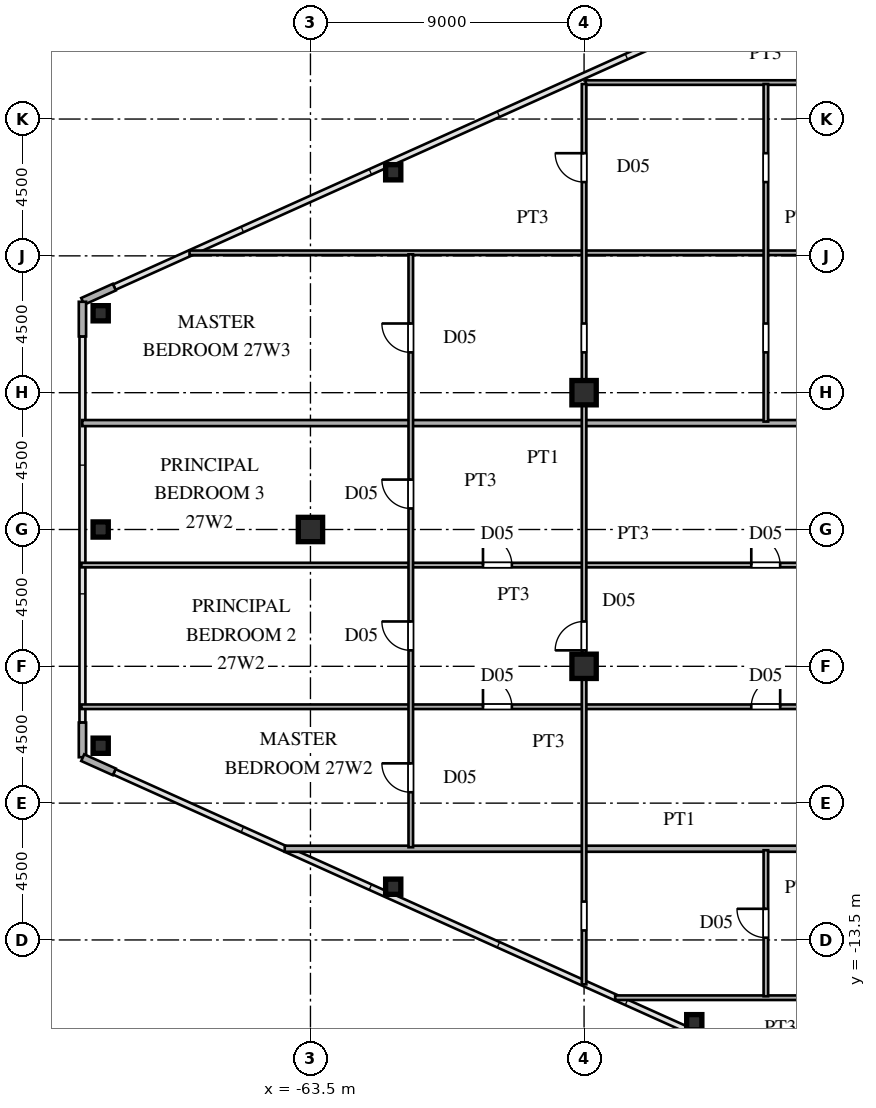
"""IFC4 building model, lengths in metres.
Left out: names, types, materials, properties, quantities, classifications, styles, units other than length and angle.
Written with IfcOpenShell. Run it as: python <this file> out.ifc"""

import sys

from ifc_helpers import new_model, si_unit, direction, frame, frame_2d, origin, origin_2d, place, context, subcontext, project, spatial, rectangle, hollow_rectangle, i_section, extrude, source, transform, mapped, element, fill, save


model = new_model("IFC4")
c1 = context("Model", 3, precision=1e-05, world=origin(), true_north=direction((0.0, 1.0)))
c2 = subcontext(c1, "Body", "Model", "MODEL_VIEW")
j1 = project(units=[si_unit("LENGTHUNIT", "METRE"), si_unit("PLANEANGLEUNIT", "RADIAN")], contexts=[c1])
p1 = place(None, origin())
s1 = spatial("IfcSite", under=j1, at=p1, CompositionType="ELEMENT")
p2 = place(p1, origin())
s2 = spatial("IfcBuilding", under=s1, at=p2, CompositionType="ELEMENT")
p3 = place(p2, frame((0.0, 0.0, 103.2)))
s3 = spatial("IfcBuildingStorey", under=s2, at=p3, CompositionType="ELEMENT", Elevation=103.2)
m1 = source(origin(), c2, "Body", "SweptSolid", [
    extrude(i_section(OverallWidth=0.8, OverallDepth=0.8, WebThickness=0.032, FlangeThickness=0.05, at=origin_2d()), origin(), (0.0, 0.0, 1.0), 3.6),
])
for number, where, z_axis, x_axis in (
    (1, (-54.5, -4.5, 0.0), (0.0, 0.0, 1.0), (1.0, 0.0, 0.0)),
    (2, (-54.5, 4.5, 0.0), (0.0, 0.0, 1.0), (1.0, 0.0, 0.0)),
    (3, (-63.5, 0.0, 0.0), (0.0, 0.0, 1.0), (1.0, 0.0, 0.0)),
):
    element("IfcColumn", number, at=place(p3, frame(where, z_axis=z_axis, x_axis=x_axis)), inside=s3, PredefinedType="COLUMN", context=c2, shape_type="MappedRepresentation", body=[
        mapped(m1, transform((0.0, 0.0, 0.0), scale=1.0)),
    ])
m2 = source(origin(), c2, "Body", "SweptSolid", [
    extrude(hollow_rectangle(XDim=0.5, YDim=0.5, WallThickness=0.02, at=origin_2d()), origin(), (0.0, 0.0, 1.0), 3.6),
])
for number, where, z_axis, x_axis in (
    (4, (-70.4, 7.112, 0.0), (0.0, 0.0, 1.0), (1.0, 0.0, 0.0)),
    (5, (-70.4, -7.112, 0.0), (0.0, 0.0, 1.0), (1.0, 0.0, 0.0)),
    (6, (-50.875, -16.205, 0.0), (0.0, 0.0, 1.0), (1.0, 0.0, 0.0)),
    (7, (-60.778, -11.749, 0.0), (0.0, 0.0, 1.0), (1.0, 0.0, 0.0)),
    (8, (-60.778, 11.749, 0.0), (0.0, 0.0, 1.0), (1.0, 0.0, 0.0)),
    (9, (-70.4, 0.0, 0.0), (0.0, 0.0, 1.0), (1.0, 0.0, 0.0)),
):
    element("IfcColumn", number, at=place(p3, frame(where, z_axis=z_axis, x_axis=x_axis)), inside=s3, PredefinedType="COLUMN", context=c2, shape_type="MappedRepresentation", body=[
        mapped(m2, transform((0.0, 0.0, 0.0), scale=1.0)),
    ])
for number, where, z_axis, x_axis in (
    (10, (-69.951, 7.972, 0.0), (0.0, 0.0, 1.0), (-0.912, -0.41, 0.0)),
    (11, (-71.0, 7.49, 0.0), (0.0, 0.0, 1.0), (0.0, -1.0, 0.0)),
    (12, (-71.0, -6.35, 0.0), (0.0, 0.0, 1.0), (0.0, -1.0, 0.0)),
    (13, (-70.991, -7.504, 0.0), (0.0, 0.0, 1.0), (0.912, -0.41, 0.0)),
):
    element("IfcWall", number, at=place(p3, frame(where, z_axis=z_axis, x_axis=x_axis)), inside=s3, PredefinedType="SOLIDWALL", context=c2, shape_type="SweptSolid", body=[
        extrude(rectangle(XDim=1.14, YDim=0.24, at=frame_2d((0.57, 0.0))), origin(), (0.0, 0.0, 1.0), 3.38),
    ])
p4 = place(p3, frame((-53.477, -15.4, 0.0), z_axis=(0.0, 0.0, 1.0), x_axis=(1.0, 0.0, 0.0)))
e14 = element("IfcWall", 14, at=p4, inside=s3, PredefinedType="PARTITIONING", context=c2, shape_type="SweptSolid", body=[
    extrude(rectangle(XDim=10.877, YDim=0.15, at=frame_2d((5.438, 0.0))), origin(), (0.0, 0.0, 1.0), 3.38),
])
p5 = place(p4, frame((7.465, 0.0, 0.0)))
e15 = element("IfcOpeningElement", 15, at=p5, cuts=e14, PredefinedType="OPENING", context=c2, shape_type="SweptSolid", body=[
    extrude(rectangle(XDim=0.95, YDim=2.15, at=frame_2d((0.475, 1.075))), frame((0.0, 0.085, 0.0), z_axis=(0.0, -1.0, 0.0), x_axis=(1.0, 0.0, 0.0)), (0.0, 0.0, 1.0), 0.17),
])
p6 = place(p3, frame((-64.346, -10.5, 0.0), z_axis=(0.0, 0.0, 1.0), x_axis=(1.0, 0.0, 0.0)))
e16 = element("IfcWall", 16, at=p6, inside=s3, PredefinedType="PARTITIONING", context=c2, shape_type="SweptSolid", body=[
    extrude(rectangle(XDim=25.966, YDim=0.2, at=frame_2d((12.983, 0.0))), origin(), (0.0, 0.0, 1.0), 3.38),
])
p7 = place(p3, frame((-71.035, -5.83, 0.0), z_axis=(0.0, 0.0, 1.0), x_axis=(1.0, 0.0, 0.0)))
e17 = element("IfcWall", 17, at=p7, inside=s3, PredefinedType="PARTITIONING", context=c2, shape_type="SweptSolid", body=[
    extrude(rectangle(XDim=28.435, YDim=0.15, at=frame_2d((14.217, 0.0))), origin(), (0.0, 0.0, 1.0), 3.38),
])
p8 = place(p7, frame((22.035, 0.0, 0.0)))
e18 = element("IfcOpeningElement", 18, at=p8, cuts=e17, PredefinedType="OPENING", context=c2, shape_type="SweptSolid", body=[
    extrude(rectangle(XDim=0.95, YDim=2.15, at=frame_2d((0.475, 1.075))), frame((0.0, 0.085, 0.0), z_axis=(0.0, -1.0, 0.0), x_axis=(1.0, 0.0, 0.0)), (0.0, 0.0, 1.0), 0.17),
])
p9 = place(p7, frame((13.21, 0.0, 0.0)))
e19 = element("IfcOpeningElement", 19, at=p9, cuts=e17, PredefinedType="OPENING", context=c2, shape_type="SweptSolid", body=[
    extrude(rectangle(XDim=0.95, YDim=2.15, at=frame_2d((0.475, 1.075))), frame((0.0, 0.085, 0.0), z_axis=(0.0, -1.0, 0.0), x_axis=(1.0, 0.0, 0.0)), (0.0, 0.0, 1.0), 0.17),
])
p10 = place(p3, frame((-71.035, -1.17, 0.0), z_axis=(0.0, 0.0, 1.0), x_axis=(1.0, 0.0, 0.0)))
e20 = element("IfcWall", 20, at=p10, inside=s3, PredefinedType="PARTITIONING", context=c2, shape_type="SweptSolid", body=[
    extrude(rectangle(XDim=28.435, YDim=0.15, at=frame_2d((14.217, 0.0))), origin(), (0.0, 0.0, 1.0), 3.38),
])
p11 = place(p10, frame((22.035, 0.0, 0.0)))
e21 = element("IfcOpeningElement", 21, at=p11, cuts=e20, PredefinedType="OPENING", context=c2, shape_type="SweptSolid", body=[
    extrude(rectangle(XDim=0.95, YDim=2.15, at=frame_2d((0.475, 1.075))), frame((0.0, 0.085, 0.0), z_axis=(0.0, -1.0, 0.0), x_axis=(1.0, 0.0, 0.0)), (0.0, 0.0, 1.0), 0.17),
])
p12 = place(p10, frame((13.21, 0.0, 0.0)))
e22 = element("IfcOpeningElement", 22, at=p12, cuts=e20, PredefinedType="OPENING", context=c2, shape_type="SweptSolid", body=[
    extrude(rectangle(XDim=0.95, YDim=2.15, at=frame_2d((0.475, 1.075))), frame((0.0, 0.085, 0.0), z_axis=(0.0, -1.0, 0.0), x_axis=(1.0, 0.0, 0.0)), (0.0, 0.0, 1.0), 0.17),
])
p13 = place(p3, frame((-71.005, 3.5, 0.0), z_axis=(0.0, 0.0, 1.0), x_axis=(1.0, 0.0, 0.0)))
e23 = element("IfcWall", 23, at=p13, inside=s3, PredefinedType="PARTITIONING", context=c2, shape_type="SweptSolid", body=[
    extrude(rectangle(XDim=32.625, YDim=0.2, at=frame_2d((16.312, 0.0))), origin(), (0.0, 0.0, 1.0), 3.38),
])
p14 = place(p3, frame((-67.478, 9.1, 0.0), z_axis=(0.0, 0.0, 1.0), x_axis=(1.0, 0.0, 0.0)))
e24 = element("IfcWall", 24, at=p14, inside=s3, PredefinedType="PARTITIONING", context=c2, shape_type="SweptSolid", body=[
    extrude(rectangle(XDim=24.878, YDim=0.15, at=frame_2d((12.439, 0.0))), origin(), (0.0, 0.0, 1.0), 3.38),
])
p15 = place(p14, frame((21.466, 0.0, 0.0)))
e25 = element("IfcOpeningElement", 25, at=p15, cuts=e24, PredefinedType="OPENING", context=c2, shape_type="SweptSolid", body=[
    extrude(rectangle(XDim=0.95, YDim=2.15, at=frame_2d((0.475, 1.075))), frame((0.0, 0.085, 0.0), z_axis=(0.0, -1.0, 0.0), x_axis=(1.0, 0.0, 0.0)), (0.0, 0.0, 1.0), 0.17),
])
p16 = place(p3, frame((-54.45, 14.7, 0.0), z_axis=(0.0, 0.0, 1.0), x_axis=(1.0, 0.0, 0.0)))
e26 = element("IfcWall", 26, at=p16, inside=s3, PredefinedType="PARTITIONING", context=c2, shape_type="SweptSolid", body=[
    extrude(rectangle(XDim=11.85, YDim=0.15, at=frame_2d((5.925, 0.0))), origin(), (0.0, 0.0, 1.0), 3.38),
])
p17 = place(p16, frame((9.401, 0.0, 0.0)))
e27 = element("IfcOpeningElement", 27, at=p17, cuts=e26, PredefinedType="OPENING", context=c2, shape_type="SweptSolid", body=[
    extrude(rectangle(XDim=0.95, YDim=2.15, at=frame_2d((0.475, 1.075))), frame((0.0, 0.085, 0.0), z_axis=(0.0, -1.0, 0.0), x_axis=(1.0, 0.0, 0.0)), (0.0, 0.0, 1.0), 0.17),
])
p18 = place(p3, frame((-60.2, -10.45, 0.0), z_axis=(0.0, 0.0, 1.0), x_axis=(0.0, 1.0, 0.0)))
e28 = element("IfcWall", 28, at=p18, inside=s3, PredefinedType="PARTITIONING", context=c2, shape_type="SweptSolid", body=[
    extrude(rectangle(XDim=19.501, YDim=0.15, at=frame_2d((9.75, 0.0))), origin(), (0.0, 0.0, 1.0), 3.38),
])
p19 = place(p18, frame((1.808, 0.0, 0.0)))
e29 = element("IfcOpeningElement", 29, at=p19, cuts=e28, PredefinedType="OPENING", context=c2, shape_type="SweptSolid", body=[
    extrude(rectangle(XDim=0.95, YDim=2.15, at=frame_2d((0.475, 1.075))), frame((0.0, 0.085, 0.0), z_axis=(0.0, -1.0, 0.0), x_axis=(1.0, 0.0, 0.0)), (0.0, 0.0, 1.0), 0.17),
])
p20 = place(p18, frame((6.475, 0.0, 0.0)))
e30 = element("IfcOpeningElement", 30, at=p20, cuts=e28, PredefinedType="OPENING", context=c2, shape_type="SweptSolid", body=[
    extrude(rectangle(XDim=0.95, YDim=2.15, at=frame_2d((0.475, 1.075))), frame((0.0, 0.085, 0.0), z_axis=(0.0, -1.0, 0.0), x_axis=(1.0, 0.0, 0.0)), (0.0, 0.0, 1.0), 0.17),
])
p21 = place(p18, frame((11.142, 0.0, 0.0)))
e31 = element("IfcOpeningElement", 31, at=p21, cuts=e28, PredefinedType="OPENING", context=c2, shape_type="SweptSolid", body=[
    extrude(rectangle(XDim=0.95, YDim=2.15, at=frame_2d((0.475, 1.075))), frame((0.0, 0.085, 0.0), z_axis=(0.0, -1.0, 0.0), x_axis=(1.0, 0.0, 0.0)), (0.0, 0.0, 1.0), 0.17),
])
p22 = place(p18, frame((16.275, 0.0, 0.0)))
e32 = element("IfcOpeningElement", 32, at=p22, cuts=e28, PredefinedType="OPENING", context=c2, shape_type="SweptSolid", body=[
    extrude(rectangle(XDim=0.95, YDim=2.15, at=frame_2d((0.475, 1.075))), frame((0.0, 0.085, 0.0), z_axis=(0.0, -1.0, 0.0), x_axis=(1.0, 0.0, 0.0)), (0.0, 0.0, 1.0), 0.17),
])
p23 = place(p3, frame((-54.5, -14.96, 0.0), z_axis=(0.0, 0.0, 1.0), x_axis=(0.0, 1.0, 0.0)))
e33 = element("IfcWall", 33, at=p23, inside=s3, PredefinedType="PARTITIONING", context=c2, shape_type="SweptSolid", body=[
    extrude(rectangle(XDim=29.612, YDim=0.15, at=frame_2d((14.806, 0.0))), origin(), (0.0, 0.0, 1.0), 2.68),
])
p24 = place(p23, frame((1.772, 0.0, 0.0)))
e34 = element("IfcOpeningElement", 34, at=p24, cuts=e33, PredefinedType="OPENING", context=c2, shape_type="SweptSolid", body=[
    extrude(rectangle(XDim=0.95, YDim=2.15, at=frame_2d((0.475, 1.075))), frame((0.0, 0.085, 0.0), z_axis=(0.0, -1.0, 0.0), x_axis=(1.0, 0.0, 0.0)), (0.0, 0.0, 1.0), 0.17),
])
p25 = place(p23, frame((10.985, 0.0, 0.0)))
e35 = element("IfcOpeningElement", 35, at=p25, cuts=e33, PredefinedType="OPENING", context=c2, shape_type="SweptSolid", body=[
    extrude(rectangle(XDim=0.95, YDim=2.15, at=frame_2d((0.475, 1.075))), frame((0.0, 0.085, 0.0), z_axis=(0.0, -1.0, 0.0), x_axis=(1.0, 0.0, 0.0)), (0.0, 0.0, 1.0), 0.17),
])
p26 = place(p23, frame((26.386, 0.0, 0.0)))
e36 = element("IfcOpeningElement", 36, at=p26, cuts=e33, PredefinedType="OPENING", context=c2, shape_type="SweptSolid", body=[
    extrude(rectangle(XDim=0.95, YDim=2.15, at=frame_2d((0.475, 1.075))), frame((0.0, 0.085, 0.0), z_axis=(0.0, -1.0, 0.0), x_axis=(1.0, 0.0, 0.0)), (0.0, 0.0, 1.0), 0.17),
])
p27 = place(p23, frame((20.785, 0.0, 0.0)))
e37 = element("IfcOpeningElement", 37, at=p27, cuts=e33, PredefinedType="OPENING", context=c2, shape_type="SweptSolid", body=[
    extrude(rectangle(XDim=0.95, YDim=2.15, at=frame_2d((0.475, 1.075))), frame((0.0, 0.085, 0.0), z_axis=(0.0, -1.0, 0.0), x_axis=(1.0, 0.0, 0.0)), (0.0, 0.0, 1.0), 0.17),
])
p28 = place(p3, frame((-48.52, -15.351, 0.0), z_axis=(0.0, 0.0, 1.0), x_axis=(0.0, 1.0, 0.0)))
e38 = element("IfcWall", 38, at=p28, inside=s3, PredefinedType="PARTITIONING", context=c2, shape_type="SweptSolid", body=[
    extrude(rectangle(XDim=4.801, YDim=0.15, at=frame_2d((2.4, 0.0))), origin(), (0.0, 0.0, 1.0), 3.38),
])
p29 = place(p28, frame((1.925, 0.0, 0.0)))
e39 = element("IfcOpeningElement", 39, at=p29, cuts=e38, PredefinedType="OPENING", context=c2, shape_type="SweptSolid", body=[
    extrude(rectangle(XDim=0.95, YDim=2.15, at=frame_2d((0.475, 1.075))), frame((0.0, 0.085, 0.0), z_axis=(0.0, -1.0, 0.0), x_axis=(1.0, 0.0, 0.0)), (0.0, 0.0, 1.0), 0.17),
])
p30 = place(p3, frame((-48.52, 3.55, 0.0), z_axis=(0.0, 0.0, 1.0), x_axis=(0.0, 1.0, 0.0)))
e40 = element("IfcWall", 40, at=p30, inside=s3, PredefinedType="PARTITIONING", context=c2, shape_type="SweptSolid", body=[
    extrude(rectangle(XDim=11.102, YDim=0.15, at=frame_2d((5.551, 0.0))), origin(), (0.0, 0.0, 1.0), 3.38),
])
p31 = place(p30, frame((7.876, 0.0, 0.0)))
e41 = element("IfcOpeningElement", 41, at=p31, cuts=e40, PredefinedType="OPENING", context=c2, shape_type="SweptSolid", body=[
    extrude(rectangle(XDim=0.95, YDim=2.15, at=frame_2d((0.475, 1.075))), frame((0.0, 0.085, 0.0), z_axis=(0.0, -1.0, 0.0), x_axis=(1.0, 0.0, 0.0)), (0.0, 0.0, 1.0), 0.17),
])
p32 = place(p30, frame((2.275, 0.0, 0.0)))
e42 = element("IfcOpeningElement", 42, at=p32, cuts=e40, PredefinedType="OPENING", context=c2, shape_type="SweptSolid", body=[
    extrude(rectangle(XDim=0.95, YDim=2.15, at=frame_2d((0.475, 1.075))), frame((0.0, 0.085, 0.0), z_axis=(0.0, -1.0, 0.0), x_axis=(1.0, 0.0, 0.0)), (0.0, 0.0, 1.0), 0.17),
])
m3 = source(origin(), c2, "Body", "SweptSolid", [
    extrude(rectangle(XDim=0.95, YDim=2.15, at=frame_2d((0.475, 1.075))), frame((0.0, 0.025, 0.0), z_axis=(0.0, -1.0, 0.0), x_axis=(1.0, 0.0, 0.0)), (0.0, 0.0, 1.0), 0.05),
])
p33 = place(p8, origin())
e43 = element("IfcDoor", 43, at=p33, inside=s3, OperationType="SINGLE_SWING_RIGHT", PredefinedType="DOOR", context=c2, shape_type="MappedRepresentation", body=[
    mapped(m3, transform((0.0, 0.0, 0.0), scale=1.0)),
])
fill(e18, e43)
p34 = place(p9, origin())
e44 = element("IfcDoor", 44, at=p34, inside=s3, OperationType="SINGLE_SWING_LEFT", PredefinedType="DOOR", context=c2, shape_type="MappedRepresentation", body=[
    mapped(m3, transform((0.0, 0.0, 0.0), scale=1.0)),
])
fill(e19, e44)
p35 = place(p11, origin())
e45 = element("IfcDoor", 45, at=p35, inside=s3, OperationType="SINGLE_SWING_LEFT", PredefinedType="DOOR", context=c2, shape_type="MappedRepresentation", body=[
    mapped(m3, transform((0.0, 0.0, 0.0), scale=1.0)),
])
fill(e21, e45)
p36 = place(p12, origin())
e46 = element("IfcDoor", 46, at=p36, inside=s3, OperationType="SINGLE_SWING_LEFT", PredefinedType="DOOR", context=c2, shape_type="MappedRepresentation", body=[
    mapped(m3, transform((0.0, 0.0, 0.0), scale=1.0)),
])
fill(e22, e46)
p37 = place(p19, origin())
e47 = element("IfcDoor", 47, at=p37, inside=s3, OperationType="SINGLE_SWING_RIGHT", PredefinedType="DOOR", context=c2, shape_type="MappedRepresentation", body=[
    mapped(m3, transform((0.0, 0.0, 0.0), scale=1.0)),
])
fill(e29, e47)
p38 = place(p20, origin())
e48 = element("IfcDoor", 48, at=p38, inside=s3, OperationType="SINGLE_SWING_RIGHT", PredefinedType="DOOR", context=c2, shape_type="MappedRepresentation", body=[
    mapped(m3, transform((0.0, 0.0, 0.0), scale=1.0)),
])
fill(e30, e48)
p39 = place(p21, origin())
e49 = element("IfcDoor", 49, at=p39, inside=s3, OperationType="SINGLE_SWING_RIGHT", PredefinedType="DOOR", context=c2, shape_type="MappedRepresentation", body=[
    mapped(m3, transform((0.0, 0.0, 0.0), scale=1.0)),
])
fill(e31, e49)
p40 = place(p22, origin())
e50 = element("IfcDoor", 50, at=p40, inside=s3, OperationType="SINGLE_SWING_RIGHT", PredefinedType="DOOR", context=c2, shape_type="MappedRepresentation", body=[
    mapped(m3, transform((0.0, 0.0, 0.0), scale=1.0)),
])
fill(e32, e50)
p41 = place(p25, origin())
e51 = element("IfcDoor", 51, at=p41, inside=s3, OperationType="SINGLE_SWING_LEFT", PredefinedType="DOOR", context=c2, shape_type="MappedRepresentation", body=[
    mapped(m3, transform((0.0, 0.0, 0.0), scale=1.0)),
])
fill(e35, e51)
p42 = place(p26, origin())
e52 = element("IfcDoor", 52, at=p42, inside=s3, OperationType="SINGLE_SWING_RIGHT", PredefinedType="DOOR", context=c2, shape_type="MappedRepresentation", body=[
    mapped(m3, transform((0.0, 0.0, 0.0), scale=1.0)),
])
fill(e36, e52)
p43 = place(p29, origin())
e53 = element("IfcDoor", 53, at=p43, inside=s3, OperationType="SINGLE_SWING_RIGHT", PredefinedType="DOOR", context=c2, shape_type="MappedRepresentation", body=[
    mapped(m3, transform((0.0, 0.0, 0.0), scale=1.0)),
])
fill(e39, e53)
save(model, sys.argv[1])
